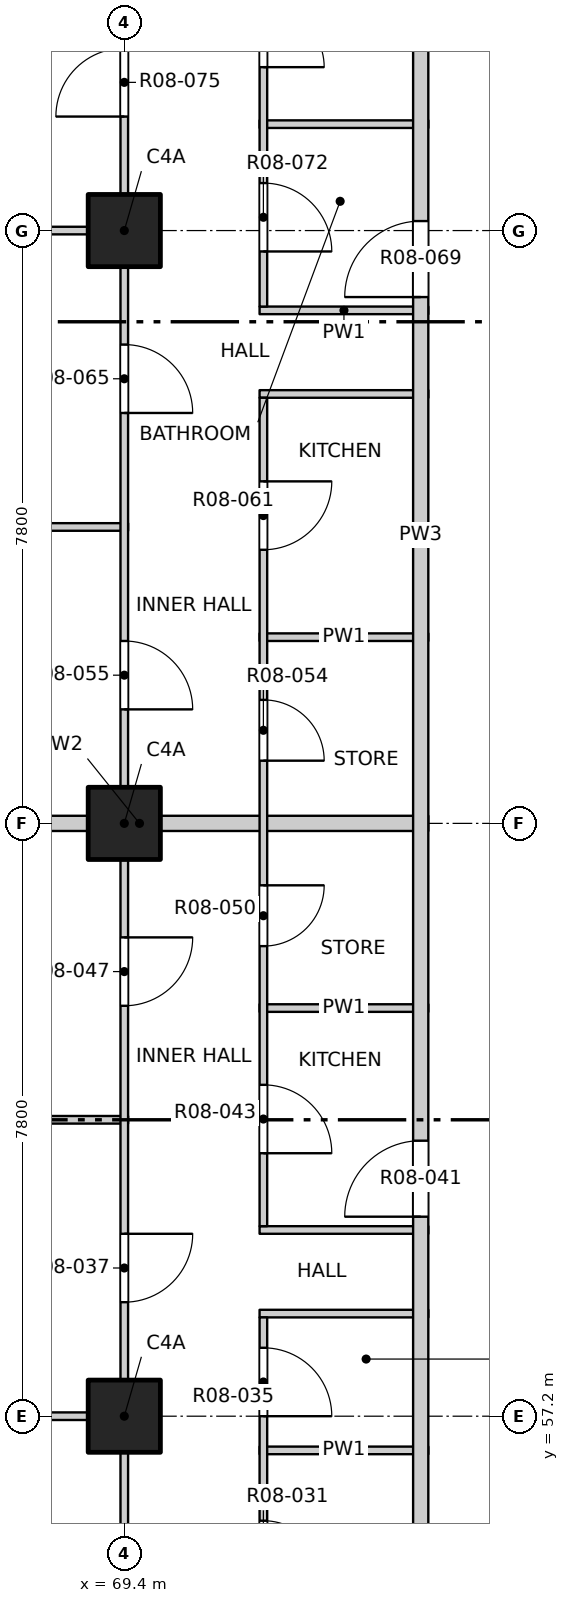
"""IFC4 building model, lengths in metres.
Left out: names, types, materials, properties, quantities, classifications, styles, units other than length and angle.
Written with IfcOpenShell. Run it as: python <this file> out.ifc"""

import sys

from ifc_helpers import new_model, si_unit, direction, frame, frame_2d, origin, origin_2d, place, context, subcontext, project, spatial, rectangle, extrude, element, fill, save


model = new_model("IFC4")
c1 = context("Model", 3, precision=1e-05, world=origin(), true_north=direction((0.0, 1.0)))
c2 = subcontext(c1, "Body", "Model", "MODEL_VIEW")
j1 = project(units=[si_unit("LENGTHUNIT", "METRE"), si_unit("PLANEANGLEUNIT", "RADIAN")], contexts=[c1])
p1 = place(None, origin())
s1 = spatial("IfcSite", under=j1, at=p1, CompositionType="ELEMENT")
p2 = place(p1, origin())
s2 = spatial("IfcBuilding", under=s1, at=p2, CompositionType="ELEMENT")
p3 = place(p2, frame((0.0, 0.0, 99.9)))
s3 = spatial("IfcBuildingStorey", under=s2, at=p3, CompositionType="ELEMENT", Elevation=99.9)
for number, where, z_axis, x_axis in (
    (1, (69.4, 57.2, -0.3), (0.0, 0.0, 1.0), (1.0, 0.0, 0.0)),
    (2, (69.4, 65.0, -0.3), (0.0, 0.0, 1.0), (1.0, 0.0, 0.0)),
    (3, (69.4, 72.8, -0.3), (0.0, 0.0, 1.0), (1.0, 0.0, 0.0)),
):
    element("IfcColumn", number, at=place(p3, frame(where, z_axis=z_axis, x_axis=x_axis)), inside=s3, PredefinedType="COLUMN", context=c2, shape_type="SweptSolid", body=[
        extrude(rectangle(XDim=0.95, YDim=0.95, at=origin_2d()), origin(), (0.0, 0.0, 1.0), 3.45),
    ])
p4 = place(p3, frame((71.18, 56.75, 0.0), z_axis=(0.0, 0.0, 1.0), x_axis=(1.0, 0.0, 0.0)))
e4 = element("IfcWall", 4, at=p4, inside=s3, PredefinedType="PARTITIONING", context=c2, shape_type="SweptSolid", body=[
    extrude(rectangle(XDim=2.22, YDim=0.1, at=frame_2d((1.11, 0.0))), origin(), (0.0, 0.0, 1.0), 3.15),
])
p5 = place(p3, frame((65.8, 57.2, 0.0), z_axis=(0.0, 0.0, 1.0), x_axis=(1.0, 0.0, 0.0)))
e5 = element("IfcWall", 5, at=p5, inside=s3, PredefinedType="PARTITIONING", context=c2, shape_type="SweptSolid", body=[
    extrude(rectangle(XDim=3.65, YDim=0.1, at=frame_2d((1.825, 0.0))), origin(), (0.0, 0.0, 1.0), 3.15),
])
for number, where, z_axis, x_axis in (
    (6, (71.18, 58.55, 0.0), (0.0, 0.0, 1.0), (1.0, 0.0, 0.0)),
    (7, (71.18, 59.65, 0.0), (0.0, 0.0, 1.0), (1.0, 0.0, 0.0)),
):
    element("IfcWall", number, at=place(p3, frame(where, z_axis=z_axis, x_axis=x_axis)), inside=s3, PredefinedType="PARTITIONING", context=c2, shape_type="SweptSolid", body=[
        extrude(rectangle(XDim=2.22, YDim=0.1, at=frame_2d((1.11, 0.0))), origin(), (0.0, 0.0, 1.0), 3.15),
    ])
p6 = place(p3, frame((65.8, 61.1, 0.0), z_axis=(0.0, 0.0, 1.0), x_axis=(1.0, 0.0, 0.0)))
e8 = element("IfcWall", 8, at=p6, inside=s3, PredefinedType="PARTITIONING", context=c2, shape_type="SweptSolid", body=[
    extrude(rectangle(XDim=3.65, YDim=0.1, at=frame_2d((1.825, 0.0))), origin(), (0.0, 0.0, 1.0), 2.55),
])
p7 = place(p3, frame((71.18, 62.57, 0.0), z_axis=(0.0, 0.0, 1.0), x_axis=(1.0, 0.0, 0.0)))
e9 = element("IfcWall", 9, at=p7, inside=s3, PredefinedType="PARTITIONING", context=c2, shape_type="SweptSolid", body=[
    extrude(rectangle(XDim=2.22, YDim=0.1, at=frame_2d((1.11, 0.0))), origin(), (0.0, 0.0, 1.0), 3.15),
])
p8 = place(p3, frame((65.8, 65.0, 0.0), z_axis=(0.0, 0.0, 1.0), x_axis=(1.0, 0.0, 0.0)))
e10 = element("IfcWall", 10, at=p8, inside=s3, PredefinedType="PARTITIONING", context=c2, shape_type="SweptSolid", body=[
    extrude(rectangle(XDim=7.6, YDim=0.2, at=frame_2d((3.8, 0.0))), origin(), (0.0, 0.0, 1.0), 3.15),
])
p9 = place(p3, frame((71.18, 67.45, 0.0), z_axis=(0.0, 0.0, 1.0), x_axis=(1.0, 0.0, 0.0)))
e11 = element("IfcWall", 11, at=p9, inside=s3, PredefinedType="PARTITIONING", context=c2, shape_type="SweptSolid", body=[
    extrude(rectangle(XDim=2.22, YDim=0.1, at=frame_2d((1.11, 0.0))), origin(), (0.0, 0.0, 1.0), 3.15),
])
p10 = place(p3, frame((65.8, 68.9, 0.0), z_axis=(0.0, 0.0, 1.0), x_axis=(1.0, 0.0, 0.0)))
e12 = element("IfcWall", 12, at=p10, inside=s3, PredefinedType="PARTITIONING", context=c2, shape_type="SweptSolid", body=[
    extrude(rectangle(XDim=3.65, YDim=0.1, at=frame_2d((1.825, 0.0))), origin(), (0.0, 0.0, 1.0), 2.55),
])
for number, where, z_axis, x_axis in (
    (13, (71.18, 70.65, 0.0), (0.0, 0.0, 1.0), (1.0, 0.0, 0.0)),
    (14, (71.18, 71.75, 0.0), (0.0, 0.0, 1.0), (1.0, 0.0, 0.0)),
):
    element("IfcWall", number, at=place(p3, frame(where, z_axis=z_axis, x_axis=x_axis)), inside=s3, PredefinedType="PARTITIONING", context=c2, shape_type="SweptSolid", body=[
        extrude(rectangle(XDim=2.22, YDim=0.1, at=frame_2d((1.11, 0.0))), origin(), (0.0, 0.0, 1.0), 3.15),
    ])
p11 = place(p3, frame((65.8, 72.8, 0.0), z_axis=(0.0, 0.0, 1.0), x_axis=(1.0, 0.0, 0.0)))
e15 = element("IfcWall", 15, at=p11, inside=s3, PredefinedType="PARTITIONING", context=c2, shape_type="SweptSolid", body=[
    extrude(rectangle(XDim=3.65, YDim=0.1, at=frame_2d((1.825, 0.0))), origin(), (0.0, 0.0, 1.0), 3.15),
])
p12 = place(p3, frame((71.18, 74.2, 0.0), z_axis=(0.0, 0.0, 1.0), x_axis=(1.0, 0.0, 0.0)))
e16 = element("IfcWall", 16, at=p12, inside=s3, PredefinedType="PARTITIONING", context=c2, shape_type="SweptSolid", body=[
    extrude(rectangle(XDim=2.22, YDim=0.1, at=frame_2d((1.11, 0.0))), origin(), (0.0, 0.0, 1.0), 3.15),
])
p13 = place(p3, frame((69.4, 45.8, 0.0), z_axis=(0.0, 0.0, 1.0), x_axis=(0.0, 1.0, 0.0)))
e17 = element("IfcWall", 17, at=p13, inside=s3, PredefinedType="PARTITIONING", context=c2, shape_type="SweptSolid", body=[
    extrude(rectangle(XDim=38.4, YDim=0.1, at=frame_2d((19.2, 0.0))), origin(), (0.0, 0.0, 1.0), 3.15),
])
p14 = place(p13, frame((1.05, 0.0, 0.0)))
e18 = element("IfcOpeningElement", 18, at=p14, cuts=e17, PredefinedType="OPENING", context=c2, shape_type="SweptSolid", body=[
    extrude(rectangle(XDim=1.2, YDim=2.1, at=frame_2d((0.6, 1.05))), frame((0.0, 0.06, 0.0), z_axis=(0.0, -1.0, 0.0), x_axis=(1.0, 0.0, 0.0)), (0.0, 0.0, 1.0), 0.12),
])
p15 = place(p13, frame((5.1, 0.0, 0.0)))
e19 = element("IfcOpeningElement", 19, at=p15, cuts=e17, PredefinedType="OPENING", context=c2, shape_type="SweptSolid", body=[
    extrude(rectangle(XDim=0.9, YDim=2.1, at=frame_2d((0.45, 1.05))), frame((0.0, 0.06, 0.0), z_axis=(0.0, -1.0, 0.0), x_axis=(1.0, 0.0, 0.0)), (0.0, 0.0, 1.0), 0.12),
])
p16 = place(p13, frame((9.0, 0.0, 0.0)))
e20 = element("IfcOpeningElement", 20, at=p16, cuts=e17, PredefinedType="OPENING", context=c2, shape_type="SweptSolid", body=[
    extrude(rectangle(XDim=0.9, YDim=2.1, at=frame_2d((0.45, 1.05))), frame((0.0, 0.06, 0.0), z_axis=(0.0, -1.0, 0.0), x_axis=(1.0, 0.0, 0.0)), (0.0, 0.0, 1.0), 0.12),
])
p17 = place(p13, frame((12.9, 0.0, 0.0)))
e21 = element("IfcOpeningElement", 21, at=p17, cuts=e17, PredefinedType="OPENING", context=c2, shape_type="SweptSolid", body=[
    extrude(rectangle(XDim=0.9, YDim=2.1, at=frame_2d((0.45, 1.05))), frame((0.0, 0.06, 0.0), z_axis=(0.0, -1.0, 0.0), x_axis=(1.0, 0.0, 0.0)), (0.0, 0.0, 1.0), 0.12),
])
p18 = place(p13, frame((16.8, 0.0, 0.0)))
e22 = element("IfcOpeningElement", 22, at=p18, cuts=e17, PredefinedType="OPENING", context=c2, shape_type="SweptSolid", body=[
    extrude(rectangle(XDim=0.9, YDim=2.1, at=frame_2d((0.45, 1.05))), frame((0.0, 0.06, 0.0), z_axis=(0.0, -1.0, 0.0), x_axis=(1.0, 0.0, 0.0)), (0.0, 0.0, 1.0), 0.12),
])
p19 = place(p13, frame((20.7, 0.0, 0.0)))
e23 = element("IfcOpeningElement", 23, at=p19, cuts=e17, PredefinedType="OPENING", context=c2, shape_type="SweptSolid", body=[
    extrude(rectangle(XDim=0.9, YDim=2.1, at=frame_2d((0.45, 1.05))), frame((0.0, 0.06, 0.0), z_axis=(0.0, -1.0, 0.0), x_axis=(1.0, 0.0, 0.0)), (0.0, 0.0, 1.0), 0.12),
])
p20 = place(p13, frame((24.6, 0.0, 0.0)))
e24 = element("IfcOpeningElement", 24, at=p20, cuts=e17, PredefinedType="OPENING", context=c2, shape_type="SweptSolid", body=[
    extrude(rectangle(XDim=0.9, YDim=2.1, at=frame_2d((0.45, 1.05))), frame((0.0, 0.06, 0.0), z_axis=(0.0, -1.0, 0.0), x_axis=(1.0, 0.0, 0.0)), (0.0, 0.0, 1.0), 0.12),
])
p21 = place(p13, frame((28.5, 0.0, 0.0)))
e25 = element("IfcOpeningElement", 25, at=p21, cuts=e17, PredefinedType="OPENING", context=c2, shape_type="SweptSolid", body=[
    extrude(rectangle(XDim=0.9, YDim=2.1, at=frame_2d((0.45, 1.05))), frame((0.0, 0.06, 0.0), z_axis=(0.0, -1.0, 0.0), x_axis=(1.0, 0.0, 0.0)), (0.0, 0.0, 1.0), 0.12),
])
p22 = place(p13, frame((32.4, 0.0, 0.0)))
e26 = element("IfcOpeningElement", 26, at=p22, cuts=e17, PredefinedType="OPENING", context=c2, shape_type="SweptSolid", body=[
    extrude(rectangle(XDim=0.9, YDim=2.1, at=frame_2d((0.45, 1.05))), frame((0.0, 0.06, 0.0), z_axis=(0.0, -1.0, 0.0), x_axis=(1.0, 0.0, 0.0)), (0.0, 0.0, 1.0), 0.12),
])
p23 = place(p13, frame((36.15, 0.0, 0.0)))
e27 = element("IfcOpeningElement", 27, at=p23, cuts=e17, PredefinedType="OPENING", context=c2, shape_type="SweptSolid", body=[
    extrude(rectangle(XDim=1.2, YDim=2.1, at=frame_2d((0.6, 1.05))), frame((0.0, 0.06, 0.0), z_axis=(0.0, -1.0, 0.0), x_axis=(1.0, 0.0, 0.0)), (0.0, 0.0, 1.0), 0.12),
])
p24 = place(p3, frame((71.23, 49.45, 0.0), z_axis=(0.0, 0.0, 1.0), x_axis=(0.0, 1.0, 0.0)))
e28 = element("IfcWall", 28, at=p24, inside=s3, PredefinedType="PARTITIONING", context=c2, shape_type="SweptSolid", body=[
    extrude(rectangle(XDim=9.05, YDim=0.1, at=frame_2d((4.525, 0.0))), origin(), (0.0, 0.0, 1.0), 3.15),
])
p25 = place(p24, frame((0.7, 0.0, 0.0)))
e29 = element("IfcOpeningElement", 29, at=p25, cuts=e28, PredefinedType="OPENING", context=c2, shape_type="SweptSolid", body=[
    extrude(rectangle(XDim=0.8, YDim=2.1, at=frame_2d((0.4, 1.05))), frame((0.0, 0.06, 0.0), z_axis=(0.0, -1.0, 0.0), x_axis=(1.0, 0.0, 0.0)), (0.0, 0.0, 1.0), 0.12),
])
p26 = place(p24, frame((3.0, 0.0, 0.0)))
e30 = element("IfcOpeningElement", 30, at=p26, cuts=e28, PredefinedType="OPENING", context=c2, shape_type="SweptSolid", body=[
    extrude(rectangle(XDim=0.9, YDim=2.1, at=frame_2d((0.45, 1.05))), frame((0.0, 0.06, 0.0), z_axis=(0.0, -1.0, 0.0), x_axis=(1.0, 0.0, 0.0)), (0.0, 0.0, 1.0), 0.12),
])
p27 = place(p24, frame((5.575, 0.0, 0.0)))
e31 = element("IfcOpeningElement", 31, at=p27, cuts=e28, PredefinedType="OPENING", context=c2, shape_type="SweptSolid", body=[
    extrude(rectangle(XDim=0.8, YDim=2.1, at=frame_2d((0.4, 1.05))), frame((0.0, 0.06, 0.0), z_axis=(0.0, -1.0, 0.0), x_axis=(1.0, 0.0, 0.0)), (0.0, 0.0, 1.0), 0.12),
])
p28 = place(p24, frame((7.75, 0.0, 0.0)))
e32 = element("IfcOpeningElement", 32, at=p28, cuts=e28, PredefinedType="OPENING", context=c2, shape_type="SweptSolid", body=[
    extrude(rectangle(XDim=0.9, YDim=2.1, at=frame_2d((0.45, 1.05))), frame((0.0, 0.06, 0.0), z_axis=(0.0, -1.0, 0.0), x_axis=(1.0, 0.0, 0.0)), (0.0, 0.0, 1.0), 0.12),
])
p29 = place(p3, frame((71.23, 59.7, 0.0), z_axis=(0.0, 0.0, 1.0), x_axis=(0.0, 1.0, 0.0)))
e33 = element("IfcWall", 33, at=p29, inside=s3, PredefinedType="PARTITIONING", context=c2, shape_type="SweptSolid", body=[
    extrude(rectangle(XDim=10.9, YDim=0.1, at=frame_2d((5.45, 0.0))), origin(), (0.0, 0.0, 1.0), 3.15),
])
p30 = place(p29, frame((0.96, 0.0, 0.0)))
e34 = element("IfcOpeningElement", 34, at=p30, cuts=e33, PredefinedType="OPENING", context=c2, shape_type="SweptSolid", body=[
    extrude(rectangle(XDim=0.9, YDim=2.1, at=frame_2d((0.45, 1.05))), frame((0.0, 0.06, 0.0), z_axis=(0.0, -1.0, 0.0), x_axis=(1.0, 0.0, 0.0)), (0.0, 0.0, 1.0), 0.12),
])
p31 = place(p29, frame((3.685, 0.0, 0.0)))
e35 = element("IfcOpeningElement", 35, at=p31, cuts=e33, PredefinedType="OPENING", context=c2, shape_type="SweptSolid", body=[
    extrude(rectangle(XDim=0.8, YDim=2.1, at=frame_2d((0.4, 1.05))), frame((0.0, 0.06, 0.0), z_axis=(0.0, -1.0, 0.0), x_axis=(1.0, 0.0, 0.0)), (0.0, 0.0, 1.0), 0.12),
])
p32 = place(p29, frame((6.125, 0.0, 0.0)))
e36 = element("IfcOpeningElement", 36, at=p32, cuts=e33, PredefinedType="OPENING", context=c2, shape_type="SweptSolid", body=[
    extrude(rectangle(XDim=0.8, YDim=2.1, at=frame_2d((0.4, 1.05))), frame((0.0, 0.06, 0.0), z_axis=(0.0, -1.0, 0.0), x_axis=(1.0, 0.0, 0.0)), (0.0, 0.0, 1.0), 0.12),
])
p33 = place(p29, frame((8.9, 0.0, 0.0)))
e37 = element("IfcOpeningElement", 37, at=p33, cuts=e33, PredefinedType="OPENING", context=c2, shape_type="SweptSolid", body=[
    extrude(rectangle(XDim=0.9, YDim=2.1, at=frame_2d((0.45, 1.05))), frame((0.0, 0.06, 0.0), z_axis=(0.0, -1.0, 0.0), x_axis=(1.0, 0.0, 0.0)), (0.0, 0.0, 1.0), 0.12),
])
p34 = place(p3, frame((71.23, 71.8, 0.0), z_axis=(0.0, 0.0, 1.0), x_axis=(0.0, 1.0, 0.0)))
e38 = element("IfcWall", 38, at=p34, inside=s3, PredefinedType="PARTITIONING", context=c2, shape_type="SweptSolid", body=[
    extrude(rectangle(XDim=8.75, YDim=0.1, at=frame_2d((4.375, 0.0))), origin(), (0.0, 0.0, 1.0), 3.15),
])
p35 = place(p34, frame((0.725, 0.0, 0.0)))
e39 = element("IfcOpeningElement", 39, at=p35, cuts=e38, PredefinedType="OPENING", context=c2, shape_type="SweptSolid", body=[
    extrude(rectangle(XDim=0.9, YDim=2.1, at=frame_2d((0.45, 1.05))), frame((0.0, 0.06, 0.0), z_axis=(0.0, -1.0, 0.0), x_axis=(1.0, 0.0, 0.0)), (0.0, 0.0, 1.0), 0.12),
])
p36 = place(p34, frame((3.15, 0.0, 0.0)))
e40 = element("IfcOpeningElement", 40, at=p36, cuts=e38, PredefinedType="OPENING", context=c2, shape_type="SweptSolid", body=[
    extrude(rectangle(XDim=0.8, YDim=2.1, at=frame_2d((0.4, 1.05))), frame((0.0, 0.06, 0.0), z_axis=(0.0, -1.0, 0.0), x_axis=(1.0, 0.0, 0.0)), (0.0, 0.0, 1.0), 0.12),
])
p37 = place(p34, frame((5.45, 0.0, 0.0)))
e41 = element("IfcOpeningElement", 41, at=p37, cuts=e38, PredefinedType="OPENING", context=c2, shape_type="SweptSolid", body=[
    extrude(rectangle(XDim=0.8, YDim=2.1, at=frame_2d((0.4, 1.05))), frame((0.0, 0.06, 0.0), z_axis=(0.0, -1.0, 0.0), x_axis=(1.0, 0.0, 0.0)), (0.0, 0.0, 1.0), 0.12),
])
p38 = place(p34, frame((7.45, 0.0, 0.0)))
e42 = element("IfcOpeningElement", 42, at=p38, cuts=e38, PredefinedType="OPENING", context=c2, shape_type="SweptSolid", body=[
    extrude(rectangle(XDim=0.9, YDim=2.1, at=frame_2d((0.45, 1.05))), frame((0.0, 0.06, 0.0), z_axis=(0.0, -1.0, 0.0), x_axis=(1.0, 0.0, 0.0)), (0.0, 0.0, 1.0), 0.12),
])
p39 = place(p3, frame((73.3, 53.4, 0.0), z_axis=(0.0, 0.0, 1.0), x_axis=(0.0, 1.0, 0.0)))
e43 = element("IfcWall", 43, at=p39, inside=s3, PredefinedType="PARTITIONING", context=c2, shape_type="SweptSolid", body=[
    extrude(rectangle(XDim=30.8, YDim=0.2, at=frame_2d((15.4, 0.0))), origin(), (0.0, 0.0, 1.0), 3.15),
])
p40 = place(p39, frame((6.425, 0.0, 0.0)))
e44 = element("IfcOpeningElement", 44, at=p40, cuts=e43, PredefinedType="OPENING", context=c2, shape_type="SweptSolid", body=[
    extrude(rectangle(XDim=1.0, YDim=2.1, at=frame_2d((0.5, 1.05))), frame((0.0, 0.11, 0.0), z_axis=(0.0, -1.0, 0.0), x_axis=(1.0, 0.0, 0.0)), (0.0, 0.0, 1.0), 0.22),
])
p41 = place(p39, frame((18.525, 0.0, 0.0)))
e45 = element("IfcOpeningElement", 45, at=p41, cuts=e43, PredefinedType="OPENING", context=c2, shape_type="SweptSolid", body=[
    extrude(rectangle(XDim=1.0, YDim=2.1, at=frame_2d((0.5, 1.05))), frame((0.0, 0.11, 0.0), z_axis=(0.0, -1.0, 0.0), x_axis=(1.0, 0.0, 0.0)), (0.0, 0.0, 1.0), 0.22),
])
p42 = place(p27, origin())
e46 = element("IfcDoor", 46, at=p42, inside=s3, OperationType="SINGLE_SWING_RIGHT", PredefinedType="DOOR", context=c2, shape_type="SweptSolid", body=[
    extrude(rectangle(XDim=0.8, YDim=2.1, at=frame_2d((0.4, 1.05))), frame((0.0, 0.025, 0.0), z_axis=(0.0, -1.0, 0.0), x_axis=(1.0, 0.0, 0.0)), (0.0, 0.0, 1.0), 0.05),
])
fill(e31, e46)
p43 = place(p28, origin())
e47 = element("IfcDoor", 47, at=p43, inside=s3, OperationType="SINGLE_SWING_RIGHT", PredefinedType="DOOR", context=c2, shape_type="SweptSolid", body=[
    extrude(rectangle(XDim=0.9, YDim=2.1, at=frame_2d((0.45, 1.05))), frame((0.0, 0.025, 0.0), z_axis=(0.0, -1.0, 0.0), x_axis=(1.0, 0.0, 0.0)), (0.0, 0.0, 1.0), 0.05),
])
fill(e32, e47)
p44 = place(p17, origin())
e48 = element("IfcDoor", 48, at=p44, inside=s3, OperationType="SINGLE_SWING_LEFT", PredefinedType="DOOR", context=c2, shape_type="SweptSolid", body=[
    extrude(rectangle(XDim=0.9, YDim=2.1, at=frame_2d((0.45, 1.05))), frame((0.0, 0.025, 0.0), z_axis=(0.0, -1.0, 0.0), x_axis=(1.0, 0.0, 0.0)), (0.0, 0.0, 1.0), 0.05),
])
fill(e21, e48)
p45 = place(p40, origin())
e49 = element("IfcDoor", 49, at=p45, inside=s3, OperationType="SINGLE_SWING_RIGHT", PredefinedType="DOOR", context=c2, shape_type="SweptSolid", body=[
    extrude(rectangle(XDim=1.0, YDim=2.1, at=frame_2d((0.5, 1.05))), frame((0.0, 0.025, 0.0), z_axis=(0.0, -1.0, 0.0), x_axis=(1.0, 0.0, 0.0)), (0.0, 0.0, 1.0), 0.05),
])
fill(e44, e49)
p46 = place(p30, origin())
e50 = element("IfcDoor", 50, at=p46, inside=s3, OperationType="SINGLE_SWING_RIGHT", PredefinedType="DOOR", context=c2, shape_type="SweptSolid", body=[
    extrude(rectangle(XDim=0.9, YDim=2.1, at=frame_2d((0.45, 1.05))), frame((0.0, 0.025, 0.0), z_axis=(0.0, -1.0, 0.0), x_axis=(1.0, 0.0, 0.0)), (0.0, 0.0, 1.0), 0.05),
])
fill(e34, e50)
p47 = place(p18, origin())
e51 = element("IfcDoor", 51, at=p47, inside=s3, OperationType="SINGLE_SWING_LEFT", PredefinedType="DOOR", context=c2, shape_type="SweptSolid", body=[
    extrude(rectangle(XDim=0.9, YDim=2.1, at=frame_2d((0.45, 1.05))), frame((0.0, 0.025, 0.0), z_axis=(0.0, -1.0, 0.0), x_axis=(1.0, 0.0, 0.0)), (0.0, 0.0, 1.0), 0.05),
])
fill(e22, e51)
p48 = place(p31, origin())
e52 = element("IfcDoor", 52, at=p48, inside=s3, OperationType="SINGLE_SWING_LEFT", PredefinedType="DOOR", context=c2, shape_type="SweptSolid", body=[
    extrude(rectangle(XDim=0.8, YDim=2.1, at=frame_2d((0.4, 1.05))), frame((0.0, 0.025, 0.0), z_axis=(0.0, -1.0, 0.0), x_axis=(1.0, 0.0, 0.0)), (0.0, 0.0, 1.0), 0.05),
])
fill(e35, e52)
p49 = place(p32, origin())
e53 = element("IfcDoor", 53, at=p49, inside=s3, OperationType="SINGLE_SWING_RIGHT", PredefinedType="DOOR", context=c2, shape_type="SweptSolid", body=[
    extrude(rectangle(XDim=0.8, YDim=2.1, at=frame_2d((0.4, 1.05))), frame((0.0, 0.025, 0.0), z_axis=(0.0, -1.0, 0.0), x_axis=(1.0, 0.0, 0.0)), (0.0, 0.0, 1.0), 0.05),
])
fill(e36, e53)
p50 = place(p19, origin())
e54 = element("IfcDoor", 54, at=p50, inside=s3, OperationType="SINGLE_SWING_RIGHT", PredefinedType="DOOR", context=c2, shape_type="SweptSolid", body=[
    extrude(rectangle(XDim=0.9, YDim=2.1, at=frame_2d((0.45, 1.05))), frame((0.0, 0.025, 0.0), z_axis=(0.0, -1.0, 0.0), x_axis=(1.0, 0.0, 0.0)), (0.0, 0.0, 1.0), 0.05),
])
fill(e23, e54)
p51 = place(p33, origin())
e55 = element("IfcDoor", 55, at=p51, inside=s3, OperationType="SINGLE_SWING_LEFT", PredefinedType="DOOR", context=c2, shape_type="SweptSolid", body=[
    extrude(rectangle(XDim=0.9, YDim=2.1, at=frame_2d((0.45, 1.05))), frame((0.0, 0.025, 0.0), z_axis=(0.0, -1.0, 0.0), x_axis=(1.0, 0.0, 0.0)), (0.0, 0.0, 1.0), 0.05),
])
fill(e37, e55)
p52 = place(p20, origin())
e56 = element("IfcDoor", 56, at=p52, inside=s3, OperationType="SINGLE_SWING_RIGHT", PredefinedType="DOOR", context=c2, shape_type="SweptSolid", body=[
    extrude(rectangle(XDim=0.9, YDim=2.1, at=frame_2d((0.45, 1.05))), frame((0.0, 0.025, 0.0), z_axis=(0.0, -1.0, 0.0), x_axis=(1.0, 0.0, 0.0)), (0.0, 0.0, 1.0), 0.05),
])
fill(e24, e56)
p53 = place(p41, origin())
e57 = element("IfcDoor", 57, at=p53, inside=s3, OperationType="SINGLE_SWING_RIGHT", PredefinedType="DOOR", context=c2, shape_type="SweptSolid", body=[
    extrude(rectangle(XDim=1.0, YDim=2.1, at=frame_2d((0.5, 1.05))), frame((0.0, 0.025, 0.0), z_axis=(0.0, -1.0, 0.0), x_axis=(1.0, 0.0, 0.0)), (0.0, 0.0, 1.0), 0.05),
])
fill(e45, e57)
p54 = place(p35, origin())
e58 = element("IfcDoor", 58, at=p54, inside=s3, OperationType="SINGLE_SWING_RIGHT", PredefinedType="DOOR", context=c2, shape_type="SweptSolid", body=[
    extrude(rectangle(XDim=0.9, YDim=2.1, at=frame_2d((0.45, 1.05))), frame((0.0, 0.025, 0.0), z_axis=(0.0, -1.0, 0.0), x_axis=(1.0, 0.0, 0.0)), (0.0, 0.0, 1.0), 0.05),
])
fill(e39, e58)
p55 = place(p21, origin())
e59 = element("IfcDoor", 59, at=p55, inside=s3, OperationType="SINGLE_SWING_LEFT", PredefinedType="DOOR", context=c2, shape_type="SweptSolid", body=[
    extrude(rectangle(XDim=0.9, YDim=2.1, at=frame_2d((0.45, 1.05))), frame((0.0, 0.025, 0.0), z_axis=(0.0, -1.0, 0.0), x_axis=(1.0, 0.0, 0.0)), (0.0, 0.0, 1.0), 0.05),
])
fill(e25, e59)
p56 = place(p36, origin())
e60 = element("IfcDoor", 60, at=p56, inside=s3, OperationType="SINGLE_SWING_RIGHT", PredefinedType="DOOR", context=c2, shape_type="SweptSolid", body=[
    extrude(rectangle(XDim=0.8, YDim=2.1, at=frame_2d((0.4, 1.05))), frame((0.0, 0.025, 0.0), z_axis=(0.0, -1.0, 0.0), x_axis=(1.0, 0.0, 0.0)), (0.0, 0.0, 1.0), 0.05),
])
fill(e40, e60)
save(model, sys.argv[1])
